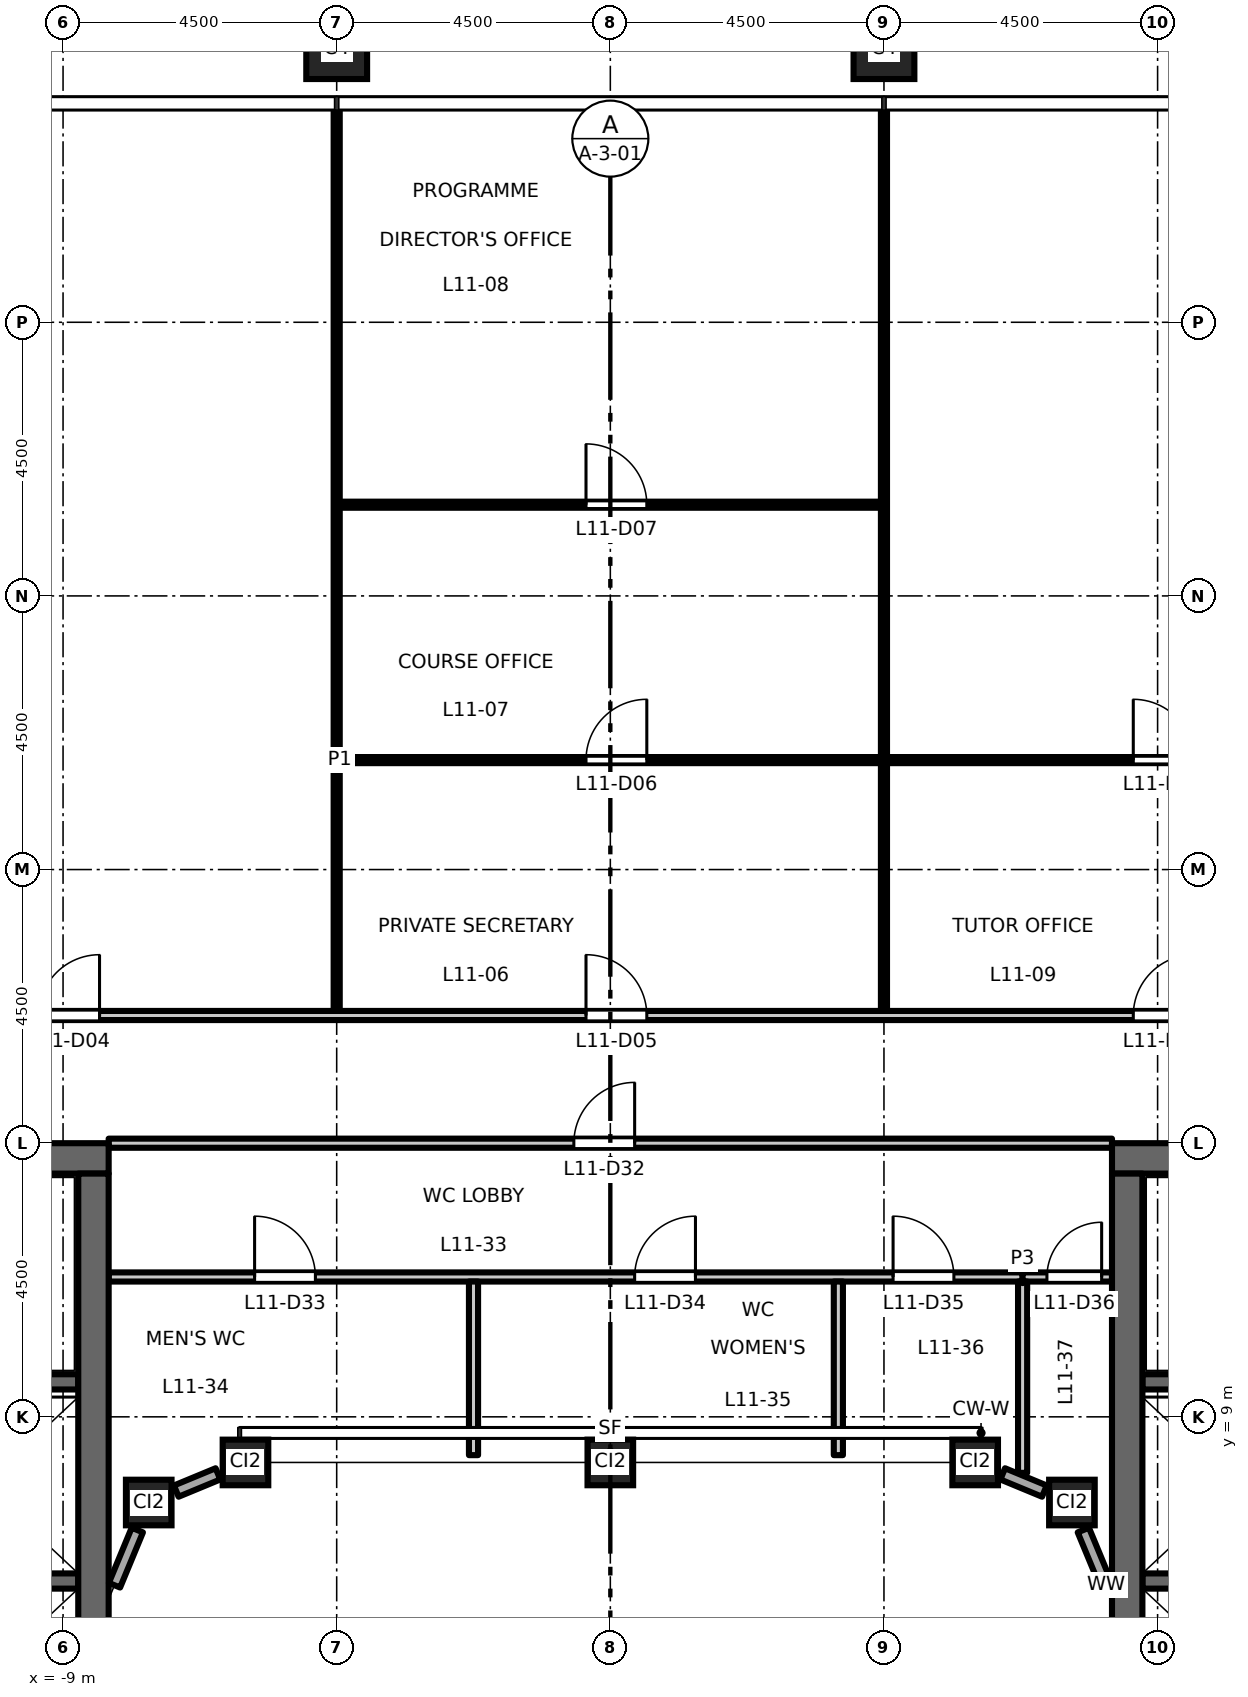
"""IFC4 building model, lengths in metres.
Left out: names, types, materials, properties, quantities, classifications, styles, units other than length and angle.
Written with IfcOpenShell. Run it as: python <this file> out.ifc"""

import sys

from ifc_helpers import new_model, si_unit, direction, frame, frame_2d, origin, origin_2d, place, context, subcontext, project, spatial, rectangle, hollow_rectangle, extrude, element, fill, save


model = new_model("IFC4")
c1 = context("Model", 3, precision=1e-05, world=origin(), true_north=direction((0.0, 1.0)))
c2 = subcontext(c1, "Body", "Model", "MODEL_VIEW")
j1 = project(units=[si_unit("LENGTHUNIT", "METRE"), si_unit("PLANEANGLEUNIT", "RADIAN")], contexts=[c1])
p1 = place(None, origin())
s1 = spatial("IfcSite", under=j1, at=p1, CompositionType="ELEMENT")
p2 = place(p1, origin())
s2 = spatial("IfcBuilding", under=s1, at=p2, CompositionType="ELEMENT")
p3 = place(p2, frame((0.0, 0.0, 53.7)))
s3 = spatial("IfcBuildingStorey", under=s2, at=p3, CompositionType="ELEMENT", Elevation=53.7)
for number, where, z_axis, x_axis in (
    (1, (4.5, 31.5, 0.0), (0.0, 0.0, 1.0), (1.0, 0.0, 0.0)),
    (2, (-4.5, 31.5, 0.0), (0.0, 0.0, 1.0), (1.0, 0.0, 0.0)),
):
    element("IfcColumn", number, at=place(p3, frame(where, z_axis=z_axis, x_axis=x_axis)), inside=s3, PredefinedType="COLUMN", context=c2, shape_type="SweptSolid", body=[
        extrude(hollow_rectangle(XDim=1.0, YDim=1.0, WallThickness=0.06, at=origin_2d()), origin(), (0.0, 0.0, 1.0), 4.5),
    ])
for number, where, z_axis, x_axis in (
    (3, (-7.591, 7.591, 0.0), (0.0, 0.0, 1.0), (1.0, 0.0, 0.0)),
    (4, (-6.0, 8.25, 0.0), (0.0, 0.0, 1.0), (1.0, 0.0, 0.0)),
    (5, (0.0, 8.25, 0.0), (0.0, 0.0, 1.0), (1.0, 0.0, 0.0)),
    (6, (6.0, 8.25, 0.0), (0.0, 0.0, 1.0), (1.0, 0.0, 0.0)),
    (7, (7.591, 7.591, 0.0), (0.0, 0.0, 1.0), (1.0, 0.0, 0.0)),
):
    element("IfcColumn", number, at=place(p3, frame(where, z_axis=z_axis, x_axis=x_axis)), inside=s3, PredefinedType="COLUMN", context=c2, shape_type="SweptSolid", body=[
        extrude(hollow_rectangle(XDim=0.75, YDim=0.75, WallThickness=0.045, at=origin_2d()), origin(), (0.0, 0.0, 1.0), 4.5),
    ])
p4 = place(p3, frame((-8.75, 6.3, 0.0), z_axis=(0.0, 0.0, 1.0), x_axis=(-1.0, 0.0, 0.0)))
e8 = element("IfcWall", 8, at=p4, inside=s3, PredefinedType="SHEAR", context=c2, shape_type="SweptSolid", body=[
    extrude(rectangle(XDim=3.1, YDim=0.25, at=frame_2d((1.55, 0.0))), origin(), (0.0, 0.0, 1.0), 4.35),
])
p5 = place(p3, frame((-8.75, 9.575, 0.0), z_axis=(0.0, 0.0, 1.0), x_axis=(-1.0, 0.0, 0.0)))
e9 = element("IfcWall", 9, at=p5, inside=s3, PredefinedType="SHEAR", context=c2, shape_type="SweptSolid", body=[
    extrude(rectangle(XDim=8.0, YDim=0.25, at=frame_2d((4.0, 0.0))), origin(), (0.0, 0.0, 1.0), 4.35),
])
p6 = place(p5, frame((6.65, 0.0, 0.0)))
e10 = element("IfcOpeningElement", 10, at=p6, cuts=e9, PredefinedType="OPENING", context=c2, shape_type="SweptSolid", body=[
    extrude(rectangle(XDim=1.1, YDim=2.1, at=frame_2d((0.55, 1.05))), frame((0.0, 0.135, 0.0), z_axis=(0.0, -1.0, 0.0), x_axis=(1.0, 0.0, 0.0)), (0.0, 0.0, 1.0), 0.27),
])
p7 = place(p3, frame((-8.25, 13.25, 0.0), z_axis=(0.0, 0.0, 1.0), x_axis=(-1.0, 0.0, 0.0)))
e11 = element("IfcWall", 11, at=p7, inside=s3, PredefinedType="SHEAR", context=c2, shape_type="SweptSolid", body=[
    extrude(rectangle(XDim=13.5, YDim=0.5, at=frame_2d((6.75, 0.0))), origin(), (0.0, 0.0, 1.0), 4.35),
])
p8 = place(p3, frame((-8.5, -13.0, 0.0), z_axis=(0.0, 0.0, 1.0), x_axis=(0.0, 1.0, 0.0)))
e12 = element("IfcWall", 12, at=p8, inside=s3, PredefinedType="SHEAR", context=c2, shape_type="SweptSolid", body=[
    extrude(rectangle(XDim=26.0, YDim=0.5, at=frame_2d((13.0, 0.0))), origin(), (0.0, 0.0, 1.0), 4.35),
])
p9 = place(p3, frame((8.75, 6.3, 0.0), z_axis=(0.0, 0.0, 1.0), x_axis=(1.0, 0.0, 0.0)))
e13 = element("IfcWall", 13, at=p9, inside=s3, PredefinedType="SHEAR", context=c2, shape_type="SweptSolid", body=[
    extrude(rectangle(XDim=3.1, YDim=0.25, at=frame_2d((1.55, 0.0))), origin(), (0.0, 0.0, 1.0), 4.35),
])
p10 = place(p3, frame((8.75, 9.575, 0.0), z_axis=(0.0, 0.0, 1.0), x_axis=(1.0, 0.0, 0.0)))
e14 = element("IfcWall", 14, at=p10, inside=s3, PredefinedType="SHEAR", context=c2, shape_type="SweptSolid", body=[
    extrude(rectangle(XDim=8.0, YDim=0.25, at=frame_2d((4.0, 0.0))), origin(), (0.0, 0.0, 1.0), 4.35),
])
p11 = place(p10, frame((6.65, 0.0, 0.0)))
e15 = element("IfcOpeningElement", 15, at=p11, cuts=e14, PredefinedType="OPENING", context=c2, shape_type="SweptSolid", body=[
    extrude(rectangle(XDim=1.1, YDim=2.1, at=frame_2d((0.55, 1.05))), frame((0.0, 0.135, 0.0), z_axis=(0.0, -1.0, 0.0), x_axis=(1.0, 0.0, 0.0)), (0.0, 0.0, 1.0), 0.27),
])
p12 = place(p3, frame((8.25, 13.25, 0.0), z_axis=(0.0, 0.0, 1.0), x_axis=(1.0, 0.0, 0.0)))
e16 = element("IfcWall", 16, at=p12, inside=s3, PredefinedType="SHEAR", context=c2, shape_type="SweptSolid", body=[
    extrude(rectangle(XDim=13.5, YDim=0.5, at=frame_2d((6.75, 0.0))), origin(), (0.0, 0.0, 1.0), 4.35),
])
p13 = place(p3, frame((8.5, -13.0, 0.0), z_axis=(0.0, 0.0, 1.0), x_axis=(0.0, 1.0, 0.0)))
e17 = element("IfcWall", 17, at=p13, inside=s3, PredefinedType="SHEAR", context=c2, shape_type="SweptSolid", body=[
    extrude(rectangle(XDim=26.0, YDim=0.5, at=frame_2d((13.0, 0.0))), origin(), (0.0, 0.0, 1.0), 4.35),
])
p14 = place(p3, frame((8.154, 6.231, 0.0), z_axis=(0.0, 0.0, 1.0), x_axis=(-0.382549378284, 0.923935048136, 0.0)))
e18 = element("IfcWall", 18, at=p14, inside=s3, PredefinedType="STANDARD", context=c2, shape_type="SweptSolid", body=[
    extrude(rectangle(XDim=0.982, YDim=0.2, at=frame_2d((0.491, 0.0))), origin(), (0.0, 0.0, 1.0), 3.73),
])
for number, where, z_axis, x_axis in (
    (19, (7.138, 7.779, 0.0), (0.0, 0.0, 1.0), (-0.924, 0.383, 0.0)),
    (20, (-6.453, 8.062, 0.0), (0.0, 0.0, 1.0), (-0.924, -0.383, 0.0)),
):
    element("IfcWall", number, at=place(p3, frame(where, z_axis=z_axis, x_axis=x_axis)), inside=s3, PredefinedType="STANDARD", context=c2, shape_type="SweptSolid", body=[
        extrude(rectangle(XDim=0.742, YDim=0.2, at=frame_2d((0.371, 0.0))), origin(), (0.0, 0.0, 1.0), 3.73),
    ])
p15 = place(p3, frame((-7.779, 7.138, 0.0), z_axis=(0.0, 0.0, 1.0), x_axis=(-0.382549378284, -0.923935048136, 0.0)))
e21 = element("IfcWall", 21, at=p15, inside=s3, PredefinedType="STANDARD", context=c2, shape_type="SweptSolid", body=[
    extrude(rectangle(XDim=0.982, YDim=0.2, at=frame_2d((0.491, 0.0))), origin(), (0.0, 0.0, 1.0), 3.73),
])
p16 = place(p3, frame((-8.25, 11.3, 0.0), z_axis=(0.0, 0.0, 1.0), x_axis=(1.0, 0.0, 0.0)))
e22 = element("IfcWall", 22, at=p16, inside=s3, PredefinedType="PARTITIONING", context=c2, shape_type="SweptSolid", body=[
    extrude(rectangle(XDim=15.03, YDim=0.15, at=frame_2d((7.515, 0.0))), origin(), (0.0, 0.0, 1.0), 4.35),
])
p17 = place(p16, frame((2.4, 0.0, 0.0)))
e23 = element("IfcOpeningElement", 23, at=p17, cuts=e22, PredefinedType="OPENING", context=c2, shape_type="SweptSolid", body=[
    extrude(rectangle(XDim=1.0, YDim=2.1, at=frame_2d((0.5, 1.05))), frame((0.0, 0.085, 0.0), z_axis=(0.0, -1.0, 0.0), x_axis=(1.0, 0.0, 0.0)), (0.0, 0.0, 1.0), 0.17),
])
p18 = place(p16, frame((8.65, 0.0, 0.0)))
e24 = element("IfcOpeningElement", 24, at=p18, cuts=e22, PredefinedType="OPENING", context=c2, shape_type="SweptSolid", body=[
    extrude(rectangle(XDim=1.0, YDim=2.1, at=frame_2d((0.5, 1.05))), frame((0.0, 0.085, 0.0), z_axis=(0.0, -1.0, 0.0), x_axis=(1.0, 0.0, 0.0)), (0.0, 0.0, 1.0), 0.17),
])
p19 = place(p16, frame((12.9, 0.0, 0.0)))
e25 = element("IfcOpeningElement", 25, at=p19, cuts=e22, PredefinedType="OPENING", context=c2, shape_type="SweptSolid", body=[
    extrude(rectangle(XDim=1.0, YDim=2.1, at=frame_2d((0.5, 1.05))), frame((0.0, 0.085, 0.0), z_axis=(0.0, -1.0, 0.0), x_axis=(1.0, 0.0, 0.0)), (0.0, 0.0, 1.0), 0.17),
])
p20 = place(p3, frame((6.78, 11.3, 0.0), z_axis=(0.0, 0.0, 1.0), x_axis=(1.0, 0.0, 0.0)))
e26 = element("IfcWall", 26, at=p20, inside=s3, PredefinedType="PARTITIONING", context=c2, shape_type="SweptSolid", body=[
    extrude(rectangle(XDim=1.47, YDim=0.15, at=frame_2d((0.735, 0.0))), origin(), (0.0, 0.0, 1.0), 4.35),
])
p21 = place(p20, frame((0.4, 0.0, 0.0)))
e27 = element("IfcOpeningElement", 27, at=p21, cuts=e26, PredefinedType="OPENING", context=c2, shape_type="SweptSolid", body=[
    extrude(rectangle(XDim=0.9, YDim=2.1, at=frame_2d((0.45, 1.05))), frame((0.0, 0.085, 0.0), z_axis=(0.0, -1.0, 0.0), x_axis=(1.0, 0.0, 0.0)), (0.0, 0.0, 1.0), 0.17),
])
p22 = place(p3, frame((-8.25, 13.5, 0.0), z_axis=(0.0, 0.0, 1.0), x_axis=(1.0, 0.0, 0.0)))
e28 = element("IfcWall", 28, at=p22, inside=s3, PredefinedType="PARTITIONING", context=c2, shape_type="SweptSolid", body=[
    extrude(rectangle(XDim=16.5, YDim=0.15, at=frame_2d((8.25, 0.0))), origin(), (0.0, 0.0, 1.0), 3.85),
])
p23 = place(p22, frame((7.65, 0.0, 0.0)))
e29 = element("IfcOpeningElement", 29, at=p23, cuts=e28, PredefinedType="OPENING", context=c2, shape_type="SweptSolid", body=[
    extrude(rectangle(XDim=1.0, YDim=2.1, at=frame_2d((0.5, 1.05))), frame((0.0, 0.085, 0.0), z_axis=(0.0, -1.0, 0.0), x_axis=(1.0, 0.0, 0.0)), (0.0, 0.0, 1.0), 0.17),
])
p24 = place(p3, frame((-23.925, 15.6, 0.0), z_axis=(0.0, 0.0, 1.0), x_axis=(1.0, 0.0, 0.0)))
e30 = element("IfcWall", 30, at=p24, inside=s3, PredefinedType="PARTITIONING", context=c2, shape_type="SweptSolid", body=[
    extrude(rectangle(XDim=47.85, YDim=0.15, at=frame_2d((23.925, 0.0))), origin(), (0.0, 0.0, 1.0), 4.35),
])
p25 = place(p24, frame((5.525, 0.0, 0.0)))
e31 = element("IfcOpeningElement", 31, at=p25, cuts=e30, PredefinedType="OPENING", context=c2, shape_type="SweptSolid", body=[
    extrude(rectangle(XDim=1.0, YDim=2.1, at=frame_2d((0.5, 1.05))), frame((0.0, 0.085, 0.0), z_axis=(0.0, -1.0, 0.0), x_axis=(1.0, 0.0, 0.0)), (0.0, 0.0, 1.0), 0.17),
])
p26 = place(p24, frame((14.525, 0.0, 0.0)))
e32 = element("IfcOpeningElement", 32, at=p26, cuts=e30, PredefinedType="OPENING", context=c2, shape_type="SweptSolid", body=[
    extrude(rectangle(XDim=1.0, YDim=2.1, at=frame_2d((0.5, 1.05))), frame((0.0, 0.085, 0.0), z_axis=(0.0, -1.0, 0.0), x_axis=(1.0, 0.0, 0.0)), (0.0, 0.0, 1.0), 0.17),
])
p27 = place(p24, frame((23.525, 0.0, 0.0)))
e33 = element("IfcOpeningElement", 33, at=p27, cuts=e30, PredefinedType="OPENING", context=c2, shape_type="SweptSolid", body=[
    extrude(rectangle(XDim=1.0, YDim=2.1, at=frame_2d((0.5, 1.05))), frame((0.0, 0.085, 0.0), z_axis=(0.0, -1.0, 0.0), x_axis=(1.0, 0.0, 0.0)), (0.0, 0.0, 1.0), 0.17),
])
p28 = place(p24, frame((32.525, 0.0, 0.0)))
e34 = element("IfcOpeningElement", 34, at=p28, cuts=e30, PredefinedType="OPENING", context=c2, shape_type="SweptSolid", body=[
    extrude(rectangle(XDim=1.0, YDim=2.1, at=frame_2d((0.5, 1.05))), frame((0.0, 0.085, 0.0), z_axis=(0.0, -1.0, 0.0), x_axis=(1.0, 0.0, 0.0)), (0.0, 0.0, 1.0), 0.17),
])
p29 = place(p24, frame((41.525, 0.0, 0.0)))
e35 = element("IfcOpeningElement", 35, at=p29, cuts=e30, PredefinedType="OPENING", context=c2, shape_type="SweptSolid", body=[
    extrude(rectangle(XDim=1.0, YDim=2.1, at=frame_2d((0.5, 1.05))), frame((0.0, 0.085, 0.0), z_axis=(0.0, -1.0, 0.0), x_axis=(1.0, 0.0, 0.0)), (0.0, 0.0, 1.0), 0.17),
])
p30 = place(p3, frame((-4.45, 19.8, 0.0), z_axis=(0.0, 0.0, 1.0), x_axis=(1.0, 0.0, 0.0)))
e36 = element("IfcWall", 36, at=p30, inside=s3, PredefinedType="PARTITIONING", context=c2, shape_type="SweptSolid", body=[
    extrude(rectangle(XDim=26.9, YDim=0.1, at=frame_2d((13.45, 0.0))), origin(), (0.0, 0.0, 1.0), 4.35),
])
p31 = place(p30, frame((4.05, 0.0, 0.0)))
e37 = element("IfcOpeningElement", 37, at=p31, cuts=e36, PredefinedType="OPENING", context=c2, shape_type="SweptSolid", body=[
    extrude(rectangle(XDim=1.0, YDim=2.1, at=frame_2d((0.5, 1.05))), frame((0.0, 0.06, 0.0), z_axis=(0.0, -1.0, 0.0), x_axis=(1.0, 0.0, 0.0)), (0.0, 0.0, 1.0), 0.12),
])
p32 = place(p30, frame((13.05, 0.0, 0.0)))
e38 = element("IfcOpeningElement", 38, at=p32, cuts=e36, PredefinedType="OPENING", context=c2, shape_type="SweptSolid", body=[
    extrude(rectangle(XDim=1.0, YDim=2.1, at=frame_2d((0.5, 1.05))), frame((0.0, 0.06, 0.0), z_axis=(0.0, -1.0, 0.0), x_axis=(1.0, 0.0, 0.0)), (0.0, 0.0, 1.0), 0.12),
])
p33 = place(p30, frame((22.05, 0.0, 0.0)))
e39 = element("IfcOpeningElement", 39, at=p33, cuts=e36, PredefinedType="OPENING", context=c2, shape_type="SweptSolid", body=[
    extrude(rectangle(XDim=1.0, YDim=2.1, at=frame_2d((0.5, 1.05))), frame((0.0, 0.06, 0.0), z_axis=(0.0, -1.0, 0.0), x_axis=(1.0, 0.0, 0.0)), (0.0, 0.0, 1.0), 0.12),
])
p34 = place(p3, frame((-4.45, 24.0, 0.0), z_axis=(0.0, 0.0, 1.0), x_axis=(1.0, 0.0, 0.0)))
e40 = element("IfcWall", 40, at=p34, inside=s3, PredefinedType="PARTITIONING", context=c2, shape_type="SweptSolid", body=[
    extrude(rectangle(XDim=8.9, YDim=0.1, at=frame_2d((4.45, 0.0))), origin(), (0.0, 0.0, 1.0), 3.85),
])
p35 = place(p34, frame((4.05, 0.0, 0.0)))
e41 = element("IfcOpeningElement", 41, at=p35, cuts=e40, PredefinedType="OPENING", context=c2, shape_type="SweptSolid", body=[
    extrude(rectangle(XDim=1.0, YDim=2.1, at=frame_2d((0.5, 1.05))), frame((0.0, 0.06, 0.0), z_axis=(0.0, -1.0, 0.0), x_axis=(1.0, 0.0, 0.0)), (0.0, 0.0, 1.0), 0.12),
])
p36 = place(p3, frame((-4.5, 15.675, 0.0), z_axis=(0.0, 0.0, 1.0), x_axis=(0.0, 1.0, 0.0)))
e42 = element("IfcWall", 42, at=p36, inside=s3, PredefinedType="PARTITIONING", context=c2, shape_type="SweptSolid", body=[
    extrude(rectangle(XDim=14.835, YDim=0.1, at=frame_2d((7.417, 0.0))), origin(), (0.0, 0.0, 1.0), 3.35),
])
for number, where, z_axis, x_axis in (
    (43, (-2.25, 8.37, 0.0), (0.0, 0.0, 1.0), (0.0, 1.0, 0.0)),
    (44, (3.75, 8.37, 0.0), (0.0, 0.0, 1.0), (0.0, 1.0, 0.0)),
):
    element("IfcWall", number, at=place(p3, frame(where, z_axis=z_axis, x_axis=x_axis)), inside=s3, PredefinedType="PARTITIONING", context=c2, shape_type="SweptSolid", body=[
        extrude(rectangle(XDim=2.855, YDim=0.15, at=frame_2d((1.427, 0.0))), origin(), (0.0, 0.0, 1.0), 4.35),
    ])
p37 = place(p3, frame((4.5, 15.675, 0.0), z_axis=(0.0, 0.0, 1.0), x_axis=(0.0, 1.0, 0.0)))
e45 = element("IfcWall", 45, at=p37, inside=s3, PredefinedType="PARTITIONING", context=c2, shape_type="SweptSolid", body=[
    extrude(rectangle(XDim=4.075, YDim=0.1, at=frame_2d((2.038, 0.0))), origin(), (0.0, 0.0, 1.0), 3.35),
])
p38 = place(p3, frame((4.5, 19.85, 0.0), z_axis=(0.0, 0.0, 1.0), x_axis=(0.0, 1.0, 0.0)))
e46 = element("IfcWall", 46, at=p38, inside=s3, PredefinedType="PARTITIONING", context=c2, shape_type="SweptSolid", body=[
    extrude(rectangle(XDim=10.66, YDim=0.1, at=frame_2d((5.33, 0.0))), origin(), (0.0, 0.0, 1.0), 3.35),
])
p39 = place(p3, frame((6.78, 8.079, 0.0), z_axis=(0.0, 0.0, 1.0), x_axis=(0.0, 1.0, 0.0)))
e47 = element("IfcWall", 47, at=p39, inside=s3, PredefinedType="PARTITIONING", context=c2, shape_type="SweptSolid", body=[
    extrude(rectangle(XDim=3.146, YDim=0.15, at=frame_2d((1.573, 0.0))), origin(), (0.0, 0.0, 1.0), 4.35),
])
p40 = place(p26, origin())
e48 = element("IfcDoor", 48, at=p40, inside=s3, OperationType="SINGLE_SWING_RIGHT", PredefinedType="DOOR", context=c2, shape_type="SweptSolid", body=[
    extrude(rectangle(XDim=1.0, YDim=2.1, at=frame_2d((0.5, 1.05))), frame((0.0, 0.025, 0.0), z_axis=(0.0, -1.0, 0.0), x_axis=(1.0, 0.0, 0.0)), (0.0, 0.0, 1.0), 0.05),
])
fill(e32, e48)
p41 = place(p27, origin())
e49 = element("IfcDoor", 49, at=p41, inside=s3, OperationType="SINGLE_SWING_LEFT", PredefinedType="DOOR", context=c2, shape_type="SweptSolid", body=[
    extrude(rectangle(XDim=1.0, YDim=2.1, at=frame_2d((0.5, 1.05))), frame((0.0, 0.025, 0.0), z_axis=(0.0, -1.0, 0.0), x_axis=(1.0, 0.0, 0.0)), (0.0, 0.0, 1.0), 0.05),
])
fill(e33, e49)
p42 = place(p31, origin())
e50 = element("IfcDoor", 50, at=p42, inside=s3, OperationType="SINGLE_SWING_RIGHT", PredefinedType="DOOR", context=c2, shape_type="SweptSolid", body=[
    extrude(rectangle(XDim=1.0, YDim=2.1, at=frame_2d((0.5, 1.05))), frame((0.0, 0.025, 0.0), z_axis=(0.0, -1.0, 0.0), x_axis=(1.0, 0.0, 0.0)), (0.0, 0.0, 1.0), 0.05),
])
fill(e37, e50)
p43 = place(p35, origin())
e51 = element("IfcDoor", 51, at=p43, inside=s3, OperationType="SINGLE_SWING_LEFT", PredefinedType="DOOR", context=c2, shape_type="SweptSolid", body=[
    extrude(rectangle(XDim=1.0, YDim=2.1, at=frame_2d((0.5, 1.05))), frame((0.0, 0.025, 0.0), z_axis=(0.0, -1.0, 0.0), x_axis=(1.0, 0.0, 0.0)), (0.0, 0.0, 1.0), 0.05),
])
fill(e41, e51)
p44 = place(p28, origin())
e52 = element("IfcDoor", 52, at=p44, inside=s3, OperationType="SINGLE_SWING_RIGHT", PredefinedType="DOOR", context=c2, shape_type="SweptSolid", body=[
    extrude(rectangle(XDim=1.0, YDim=2.1, at=frame_2d((0.5, 1.05))), frame((0.0, 0.025, 0.0), z_axis=(0.0, -1.0, 0.0), x_axis=(1.0, 0.0, 0.0)), (0.0, 0.0, 1.0), 0.05),
])
fill(e34, e52)
p45 = place(p32, origin())
e53 = element("IfcDoor", 53, at=p45, inside=s3, OperationType="SINGLE_SWING_LEFT", PredefinedType="DOOR", context=c2, shape_type="SweptSolid", body=[
    extrude(rectangle(XDim=1.0, YDim=2.1, at=frame_2d((0.5, 1.05))), frame((0.0, 0.025, 0.0), z_axis=(0.0, -1.0, 0.0), x_axis=(1.0, 0.0, 0.0)), (0.0, 0.0, 1.0), 0.05),
])
fill(e38, e53)
p46 = place(p23, origin())
e54 = element("IfcDoor", 54, at=p46, inside=s3, OperationType="SINGLE_SWING_RIGHT", PredefinedType="DOOR", context=c2, shape_type="SweptSolid", body=[
    extrude(rectangle(XDim=1.0, YDim=2.1, at=frame_2d((0.5, 1.05))), frame((0.0, 0.025, 0.0), z_axis=(0.0, -1.0, 0.0), x_axis=(1.0, 0.0, 0.0)), (0.0, 0.0, 1.0), 0.05),
])
fill(e29, e54)
p47 = place(p17, origin())
e55 = element("IfcDoor", 55, at=p47, inside=s3, OperationType="SINGLE_SWING_LEFT", PredefinedType="DOOR", context=c2, shape_type="SweptSolid", body=[
    extrude(rectangle(XDim=1.0, YDim=2.1, at=frame_2d((0.5, 1.05))), frame((0.0, 0.025, 0.0), z_axis=(0.0, -1.0, 0.0), x_axis=(1.0, 0.0, 0.0)), (0.0, 0.0, 1.0), 0.05),
])
fill(e23, e55)
p48 = place(p18, origin())
e56 = element("IfcDoor", 56, at=p48, inside=s3, OperationType="SINGLE_SWING_RIGHT", PredefinedType="DOOR", context=c2, shape_type="SweptSolid", body=[
    extrude(rectangle(XDim=1.0, YDim=2.1, at=frame_2d((0.5, 1.05))), frame((0.0, 0.025, 0.0), z_axis=(0.0, -1.0, 0.0), x_axis=(1.0, 0.0, 0.0)), (0.0, 0.0, 1.0), 0.05),
])
fill(e24, e56)
p49 = place(p19, origin())
e57 = element("IfcDoor", 57, at=p49, inside=s3, OperationType="SINGLE_SWING_LEFT", PredefinedType="DOOR", context=c2, shape_type="SweptSolid", body=[
    extrude(rectangle(XDim=1.0, YDim=2.1, at=frame_2d((0.5, 1.05))), frame((0.0, 0.025, 0.0), z_axis=(0.0, -1.0, 0.0), x_axis=(1.0, 0.0, 0.0)), (0.0, 0.0, 1.0), 0.05),
])
fill(e25, e57)
p50 = place(p21, origin())
e58 = element("IfcDoor", 58, at=p50, inside=s3, OperationType="SINGLE_SWING_RIGHT", PredefinedType="DOOR", context=c2, shape_type="SweptSolid", body=[
    extrude(rectangle(XDim=0.9, YDim=2.1, at=frame_2d((0.45, 1.05))), frame((0.0, 0.025, 0.0), z_axis=(0.0, -1.0, 0.0), x_axis=(1.0, 0.0, 0.0)), (0.0, 0.0, 1.0), 0.05),
])
fill(e27, e58)
save(model, sys.argv[1])
